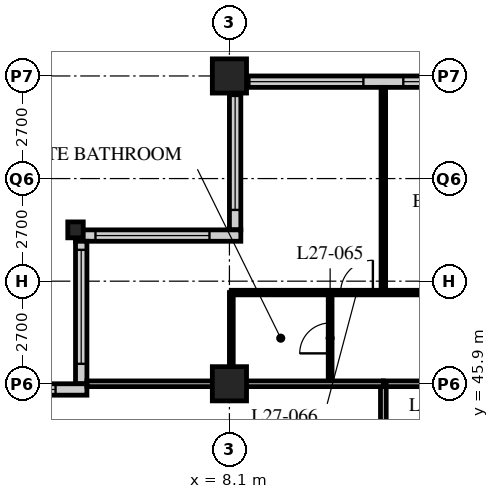
"""IFC4 building model, lengths in metres.
Left out: names, types, materials, properties, quantities, classifications, styles, units other than length and angle.
Written with IfcOpenShell. Run it as: python <this file> out.ifc"""

import sys

from ifc_helpers import new_model, si_unit, direction, frame, frame_2d, origin, origin_2d, place, context, subcontext, project, spatial, rectangle, hollow_rectangle, i_section, extrude, element, fill, save


model = new_model("IFC4")
c1 = context("Model", 3, precision=1e-05, world=origin(), true_north=direction((0.0, 1.0)))
c2 = subcontext(c1, "Body", "Model", "MODEL_VIEW")
j1 = project(units=[si_unit("LENGTHUNIT", "METRE"), si_unit("PLANEANGLEUNIT", "RADIAN")], contexts=[c1])
p1 = place(None, origin())
s1 = spatial("IfcSite", under=j1, at=p1, CompositionType="ELEMENT")
p2 = place(p1, origin())
s2 = spatial("IfcBuilding", under=s1, at=p2, CompositionType="ELEMENT")
p3 = place(p2, frame((0.0, 0.0, 110.2)))
s3 = spatial("IfcBuildingStorey", under=s2, at=p3, CompositionType="ELEMENT", Elevation=110.2)
p4 = place(p3, frame((4.05, 49.95, 0.0), z_axis=(0.0, 0.0, 1.0), x_axis=(1.0, 0.0, 0.0)))
e1 = element("IfcColumn", 1, at=p4, inside=s3, PredefinedType="COLUMN", context=c2, shape_type="SweptSolid", body=[
    extrude(i_section(OverallWidth=0.407, OverallDepth=0.419, WebThickness=0.031, FlangeThickness=0.049, FilletRadius=0.015, at=origin_2d()), origin(), (0.0, 0.0, 1.0), 3.4),
])
for number, where, z_axis, x_axis in (
    (2, (8.1, 45.9, 0.0), (0.0, 0.0, 1.0), (1.0, 0.0, 0.0)),
    (3, (8.1, 54.0, 0.0), (0.0, 0.0, 1.0), (1.0, 0.0, 0.0)),
):
    element("IfcColumn", number, at=place(p3, frame(where, z_axis=z_axis, x_axis=x_axis)), inside=s3, PredefinedType="COLUMN", context=c2, shape_type="SweptSolid", body=[
        extrude(hollow_rectangle(XDim=0.9, YDim=0.9, WallThickness=0.09, at=origin_2d()), origin(), (0.0, 0.0, 1.0), 3.4),
    ])
p5 = place(p3, frame((48.3, 53.85, 0.0), z_axis=(0.0, 0.0, 1.0), x_axis=(-1.0, 0.0, 0.0)))
e4 = element("IfcWall", 4, at=p5, inside=s3, PredefinedType="SOLIDWALL", context=c2, shape_type="SweptSolid", body=[
    extrude(rectangle(XDim=40.2, YDim=0.3, at=frame_2d((20.1, 0.0))), origin(), (0.0, 0.0, 1.0), 3.19),
])
p6 = place(p5, frame((0.225, 0.0, 0.9)))
e5 = element("IfcOpeningElement", 5, at=p6, cuts=e4, PredefinedType="OPENING", context=c2, shape_type="SweptSolid", body=[
    extrude(rectangle(XDim=3.0, YDim=2.0, at=frame_2d((1.5, 1.0))), frame((0.0, 0.16, 0.0), z_axis=(0.0, -1.0, 0.0), x_axis=(1.0, 0.0, 0.0)), (0.0, 0.0, 1.0), 0.32),
])
p7 = place(p5, frame((4.275, 0.0, 0.9)))
e6 = element("IfcOpeningElement", 6, at=p7, cuts=e4, PredefinedType="OPENING", context=c2, shape_type="SweptSolid", body=[
    extrude(rectangle(XDim=3.0, YDim=2.0, at=frame_2d((1.5, 1.0))), frame((0.0, 0.16, 0.0), z_axis=(0.0, -1.0, 0.0), x_axis=(1.0, 0.0, 0.0)), (0.0, 0.0, 1.0), 0.32),
])
p8 = place(p5, frame((8.325, 0.0, 0.9)))
e7 = element("IfcOpeningElement", 7, at=p8, cuts=e4, PredefinedType="OPENING", context=c2, shape_type="SweptSolid", body=[
    extrude(rectangle(XDim=3.0, YDim=2.0, at=frame_2d((1.5, 1.0))), frame((0.0, 0.16, 0.0), z_axis=(0.0, -1.0, 0.0), x_axis=(1.0, 0.0, 0.0)), (0.0, 0.0, 1.0), 0.32),
])
p9 = place(p5, frame((12.375, 0.0, 0.9)))
e8 = element("IfcOpeningElement", 8, at=p9, cuts=e4, PredefinedType="OPENING", context=c2, shape_type="SweptSolid", body=[
    extrude(rectangle(XDim=3.0, YDim=2.0, at=frame_2d((1.5, 1.0))), frame((0.0, 0.16, 0.0), z_axis=(0.0, -1.0, 0.0), x_axis=(1.0, 0.0, 0.0)), (0.0, 0.0, 1.0), 0.32),
])
p10 = place(p5, frame((16.425, 0.0, 0.9)))
e9 = element("IfcOpeningElement", 9, at=p10, cuts=e4, PredefinedType="OPENING", context=c2, shape_type="SweptSolid", body=[
    extrude(rectangle(XDim=3.0, YDim=2.0, at=frame_2d((1.5, 1.0))), frame((0.0, 0.16, 0.0), z_axis=(0.0, -1.0, 0.0), x_axis=(1.0, 0.0, 0.0)), (0.0, 0.0, 1.0), 0.32),
])
p11 = place(p5, frame((20.475, 0.0, 0.9)))
e10 = element("IfcOpeningElement", 10, at=p11, cuts=e4, PredefinedType="OPENING", context=c2, shape_type="SweptSolid", body=[
    extrude(rectangle(XDim=3.0, YDim=2.0, at=frame_2d((1.5, 1.0))), frame((0.0, 0.16, 0.0), z_axis=(0.0, -1.0, 0.0), x_axis=(1.0, 0.0, 0.0)), (0.0, 0.0, 1.0), 0.32),
])
p12 = place(p5, frame((24.525, 0.0, 0.9)))
e11 = element("IfcOpeningElement", 11, at=p12, cuts=e4, PredefinedType="OPENING", context=c2, shape_type="SweptSolid", body=[
    extrude(rectangle(XDim=3.0, YDim=2.0, at=frame_2d((1.5, 1.0))), frame((0.0, 0.16, 0.0), z_axis=(0.0, -1.0, 0.0), x_axis=(1.0, 0.0, 0.0)), (0.0, 0.0, 1.0), 0.32),
])
p13 = place(p5, frame((28.575, 0.0, 0.9)))
e12 = element("IfcOpeningElement", 12, at=p13, cuts=e4, PredefinedType="OPENING", context=c2, shape_type="SweptSolid", body=[
    extrude(rectangle(XDim=3.0, YDim=2.0, at=frame_2d((1.5, 1.0))), frame((0.0, 0.16, 0.0), z_axis=(0.0, -1.0, 0.0), x_axis=(1.0, 0.0, 0.0)), (0.0, 0.0, 1.0), 0.32),
])
p14 = place(p5, frame((32.625, 0.0, 0.9)))
e13 = element("IfcOpeningElement", 13, at=p14, cuts=e4, PredefinedType="OPENING", context=c2, shape_type="SweptSolid", body=[
    extrude(rectangle(XDim=3.0, YDim=2.0, at=frame_2d((1.5, 1.0))), frame((0.0, 0.16, 0.0), z_axis=(0.0, -1.0, 0.0), x_axis=(1.0, 0.0, 0.0)), (0.0, 0.0, 1.0), 0.32),
])
p15 = place(p5, frame((36.675, 0.0, 0.9)))
e14 = element("IfcOpeningElement", 14, at=p15, cuts=e4, PredefinedType="OPENING", context=c2, shape_type="SweptSolid", body=[
    extrude(rectangle(XDim=3.0, YDim=2.0, at=frame_2d((1.5, 1.0))), frame((0.0, 0.16, 0.0), z_axis=(0.0, -1.0, 0.0), x_axis=(1.0, 0.0, 0.0)), (0.0, 0.0, 1.0), 0.32),
])
p16 = place(p3, frame((8.25, 53.7, 0.0), z_axis=(0.0, 0.0, 1.0), x_axis=(0.0, -1.0, 0.0)))
e15 = element("IfcWall", 15, at=p16, inside=s3, PredefinedType="SOLIDWALL", context=c2, shape_type="SweptSolid", body=[
    extrude(rectangle(XDim=3.75, YDim=0.3, at=frame_2d((1.875, 0.0))), origin(), (0.0, 0.0, 1.0), 3.19),
])
p17 = place(p16, frame((0.225, 0.0, 0.9)))
e16 = element("IfcOpeningElement", 16, at=p17, cuts=e15, PredefinedType="OPENING", context=c2, shape_type="SweptSolid", body=[
    extrude(rectangle(XDim=3.0, YDim=1.5, at=frame_2d((1.5, 0.75))), frame((0.0, 0.16, 0.0), z_axis=(0.0, -1.0, 0.0), x_axis=(1.0, 0.0, 0.0)), (0.0, 0.0, 1.0), 0.32),
])
p18 = place(p3, frame((8.4, 49.8, 0.0), z_axis=(0.0, 0.0, 1.0), x_axis=(-1.0, 0.0, 0.0)))
e17 = element("IfcWall", 17, at=p18, inside=s3, PredefinedType="SOLIDWALL", context=c2, shape_type="SweptSolid", body=[
    extrude(rectangle(XDim=4.35, YDim=0.3, at=frame_2d((2.175, 0.0))), origin(), (0.0, 0.0, 1.0), 3.19),
])
p19 = place(p18, frame((0.825, 0.0, 0.9)))
e18 = element("IfcOpeningElement", 18, at=p19, cuts=e17, PredefinedType="OPENING", context=c2, shape_type="SweptSolid", body=[
    extrude(rectangle(XDim=3.0, YDim=1.5, at=frame_2d((1.5, 0.75))), frame((0.0, 0.16, 0.0), z_axis=(0.0, -1.0, 0.0), x_axis=(1.0, 0.0, 0.0)), (0.0, 0.0, 1.0), 0.32),
])
p20 = place(p3, frame((4.2, 49.65, 0.0), z_axis=(0.0, 0.0, 1.0), x_axis=(0.0, -1.0, 0.0)))
e19 = element("IfcWall", 19, at=p20, inside=s3, PredefinedType="SOLIDWALL", context=c2, shape_type="SweptSolid", body=[
    extrude(rectangle(XDim=3.75, YDim=0.3, at=frame_2d((1.875, 0.0))), origin(), (0.0, 0.0, 1.0), 3.19),
])
p21 = place(p20, frame((0.225, 0.0, 0.9)))
e20 = element("IfcOpeningElement", 20, at=p21, cuts=e19, PredefinedType="OPENING", context=c2, shape_type="SweptSolid", body=[
    extrude(rectangle(XDim=3.0, YDim=1.5, at=frame_2d((1.5, 0.75))), frame((0.0, 0.16, 0.0), z_axis=(0.0, -1.0, 0.0), x_axis=(1.0, 0.0, 0.0)), (0.0, 0.0, 1.0), 0.32),
])
p22 = place(p3, frame((4.35, 45.75, 0.0), z_axis=(0.0, 0.0, 1.0), x_axis=(-1.0, 0.0, 0.0)))
e21 = element("IfcWall", 21, at=p22, inside=s3, PredefinedType="SOLIDWALL", context=c2, shape_type="SweptSolid", body=[
    extrude(rectangle(XDim=4.35, YDim=0.3, at=frame_2d((2.175, 0.0))), origin(), (0.0, 0.0, 1.0), 3.19),
])
p23 = place(p22, frame((0.825, 0.0, 0.9)))
e22 = element("IfcOpeningElement", 22, at=p23, cuts=e21, PredefinedType="OPENING", context=c2, shape_type="SweptSolid", body=[
    extrude(rectangle(XDim=3.0, YDim=1.5, at=frame_2d((1.5, 0.75))), frame((0.0, 0.16, 0.0), z_axis=(0.0, -1.0, 0.0), x_axis=(1.0, 0.0, 0.0)), (0.0, 0.0, 1.0), 0.32),
])
p24 = place(p3, frame((12.15, 45.9, 0.0), z_axis=(0.0, 0.0, 1.0), x_axis=(1.0, 0.0, 0.0)))
e23 = element("IfcWall", 23, at=p24, inside=s3, PredefinedType="PARTITIONING", context=c2, shape_type="SweptSolid", body=[
    extrude(rectangle(XDim=32.4, YDim=0.15, at=frame_2d((16.2, 0.0))), origin(), (0.0, 0.0, 1.0), 2.578),
])
p25 = place(p24, frame((9.5, 0.0, 0.0)))
e24 = element("IfcOpeningElement", 24, at=p25, cuts=e23, PredefinedType="OPENING", context=c2, shape_type="SweptSolid", body=[
    extrude(rectangle(XDim=1.0, YDim=2.1, at=frame_2d((0.5, 1.05))), frame((0.0, 0.085, 0.0), z_axis=(0.0, -1.0, 0.0), x_axis=(1.0, 0.0, 0.0)), (0.0, 0.0, 1.0), 0.17),
])
p26 = place(p24, frame((17.6, 0.0, 0.0)))
e25 = element("IfcOpeningElement", 25, at=p26, cuts=e23, PredefinedType="OPENING", context=c2, shape_type="SweptSolid", body=[
    extrude(rectangle(XDim=1.0, YDim=2.1, at=frame_2d((0.5, 1.05))), frame((0.0, 0.085, 0.0), z_axis=(0.0, -1.0, 0.0), x_axis=(1.0, 0.0, 0.0)), (0.0, 0.0, 1.0), 0.17),
])
p27 = place(p24, frame((25.7, 0.0, 0.0)))
e26 = element("IfcOpeningElement", 26, at=p27, cuts=e23, PredefinedType="OPENING", context=c2, shape_type="SweptSolid", body=[
    extrude(rectangle(XDim=1.0, YDim=2.1, at=frame_2d((0.5, 1.05))), frame((0.0, 0.085, 0.0), z_axis=(0.0, -1.0, 0.0), x_axis=(1.0, 0.0, 0.0)), (0.0, 0.0, 1.0), 0.17),
])
p28 = place(p24, frame((29.875, 0.0, 0.0)))
e27 = element("IfcOpeningElement", 27, at=p28, cuts=e23, PredefinedType="OPENING", context=c2, shape_type="SweptSolid", body=[
    extrude(rectangle(XDim=1.0, YDim=2.1, at=frame_2d((0.5, 1.05))), frame((0.0, 0.085, 0.0), z_axis=(0.0, -1.0, 0.0), x_axis=(1.0, 0.0, 0.0)), (0.0, 0.0, 1.0), 0.17),
])
p29 = place(p24, frame((1.525, 0.0, 0.0)))
e28 = element("IfcOpeningElement", 28, at=p29, cuts=e23, PredefinedType="OPENING", context=c2, shape_type="SweptSolid", body=[
    extrude(rectangle(XDim=1.0, YDim=2.1, at=frame_2d((0.5, 1.05))), frame((0.0, 0.085, 0.0), z_axis=(0.0, -1.0, 0.0), x_axis=(1.0, 0.0, 0.0)), (0.0, 0.0, 1.0), 0.17),
])
p30 = place(p3, frame((12.15, 21.6, 0.0), z_axis=(0.0, 0.0, 1.0), x_axis=(0.0, 1.0, 0.0)))
e29 = element("IfcWall", 29, at=p30, inside=s3, PredefinedType="PARTITIONING", context=c2, shape_type="SweptSolid", body=[
    extrude(rectangle(XDim=24.3, YDim=0.15, at=frame_2d((12.15, 0.0))), origin(), (0.0, 0.0, 1.0), 3.19),
])
p31 = place(p30, frame((5.45, 0.0, 0.0)))
e30 = element("IfcOpeningElement", 30, at=p31, cuts=e29, PredefinedType="OPENING", context=c2, shape_type="SweptSolid", body=[
    extrude(rectangle(XDim=1.0, YDim=2.1, at=frame_2d((0.5, 1.05))), frame((0.0, 0.085, 0.0), z_axis=(0.0, -1.0, 0.0), x_axis=(1.0, 0.0, 0.0)), (0.0, 0.0, 1.0), 0.17),
])
p32 = place(p30, frame((13.55, 0.0, 0.0)))
e31 = element("IfcOpeningElement", 31, at=p32, cuts=e29, PredefinedType="OPENING", context=c2, shape_type="SweptSolid", body=[
    extrude(rectangle(XDim=1.0, YDim=2.1, at=frame_2d((0.5, 1.05))), frame((0.0, 0.085, 0.0), z_axis=(0.0, -1.0, 0.0), x_axis=(1.0, 0.0, 0.0)), (0.0, 0.0, 1.0), 0.17),
])
p33 = place(p30, frame((21.65, 0.0, 0.0)))
e32 = element("IfcOpeningElement", 32, at=p33, cuts=e29, PredefinedType="OPENING", context=c2, shape_type="SweptSolid", body=[
    extrude(rectangle(XDim=1.0, YDim=2.1, at=frame_2d((0.5, 1.05))), frame((0.0, 0.085, 0.0), z_axis=(0.0, -1.0, 0.0), x_axis=(1.0, 0.0, 0.0)), (0.0, 0.0, 1.0), 0.17),
])
p34 = place(p3, frame((10.75, 45.9, 0.0), z_axis=(0.0, 0.0, 1.0), x_axis=(0.0, 1.0, 0.0)))
e33 = element("IfcWall", 33, at=p34, inside=s3, PredefinedType="PARTITIONING", context=c2, shape_type="SweptSolid", body=[
    extrude(rectangle(XDim=2.4, YDim=0.1, at=frame_2d((1.2, 0.0))), origin(), (0.0, 0.0, 1.0), 3.19),
])
p35 = place(p34, frame((0.8, 0.0, 0.0)))
e34 = element("IfcOpeningElement", 34, at=p35, cuts=e33, PredefinedType="OPENING", context=c2, shape_type="SweptSolid", body=[
    extrude(rectangle(XDim=0.8, YDim=2.1, at=frame_2d((0.4, 1.05))), frame((0.0, 0.06, 0.0), z_axis=(0.0, -1.0, 0.0), x_axis=(1.0, 0.0, 0.0)), (0.0, 0.0, 1.0), 0.12),
])
p36 = place(p3, frame((8.15, 45.9, 0.0), z_axis=(0.0, 0.0, 1.0), x_axis=(0.0, 1.0, 0.0)))
e35 = element("IfcWall", 35, at=p36, inside=s3, PredefinedType="PARTITIONING", context=c2, shape_type="SweptSolid", body=[
    extrude(rectangle(XDim=2.4, YDim=0.1, at=frame_2d((1.2, 0.0))), origin(), (0.0, 0.0, 1.0), 2.578),
])
p37 = place(p3, frame((8.15, 48.3, 0.0), z_axis=(0.0, 0.0, 1.0), x_axis=(1.0, 0.0, 0.0)))
e36 = element("IfcWall", 36, at=p37, inside=s3, PredefinedType="PARTITIONING", context=c2, shape_type="SweptSolid", body=[
    extrude(rectangle(XDim=8.05, YDim=0.12, at=frame_2d((4.025, 0.0))), origin(), (0.0, 0.0, 1.0), 3.19),
])
p38 = place(p37, frame((6.725, 0.0, 0.0)))
e37 = element("IfcOpeningElement", 37, at=p38, cuts=e36, PredefinedType="OPENING", context=c2, shape_type="SweptSolid", body=[
    extrude(rectangle(XDim=0.85, YDim=2.1, at=frame_2d((0.425, 1.05))), frame((0.0, 0.07, 0.0), z_axis=(0.0, -1.0, 0.0), x_axis=(1.0, 0.0, 0.0)), (0.0, 0.0, 1.0), 0.14),
])
p39 = place(p37, frame((2.875, 0.0, 0.0)))
e38 = element("IfcOpeningElement", 38, at=p39, cuts=e36, PredefinedType="OPENING", context=c2, shape_type="SweptSolid", body=[
    extrude(rectangle(XDim=0.85, YDim=2.1, at=frame_2d((0.425, 1.05))), frame((0.0, 0.07, 0.0), z_axis=(0.0, -1.0, 0.0), x_axis=(1.0, 0.0, 0.0)), (0.0, 0.0, 1.0), 0.14),
])
p40 = place(p3, frame((12.15, 48.3, 0.0), z_axis=(0.0, 0.0, 1.0), x_axis=(0.0, 1.0, 0.0)))
e39 = element("IfcWall", 39, at=p40, inside=s3, PredefinedType="PARTITIONING", context=c2, shape_type="SweptSolid", body=[
    extrude(rectangle(XDim=5.4, YDim=0.12, at=frame_2d((2.7, 0.0))), origin(), (0.0, 0.0, 1.0), 3.19),
])
p41 = place(p3, frame((4.35, 45.9, 0.0), z_axis=(0.0, 0.0, 1.0), x_axis=(1.0, 0.0, 0.0)))
e40 = element("IfcWall", 40, at=p41, inside=s3, PredefinedType="PARTITIONING", context=c2, shape_type="SweptSolid", body=[
    extrude(rectangle(XDim=7.8, YDim=0.15, at=frame_2d((3.9, 0.0))), origin(), (0.0, 0.0, 1.0), 2.578),
])
p42 = place(p14, origin())
e41 = element("IfcWindow", 41, at=p42, inside=s3, PartitioningType="SINGLE_PANEL", PredefinedType="WINDOW", context=c2, shape_type="SweptSolid", body=[
    extrude(rectangle(XDim=3.0, YDim=2.0, at=frame_2d((1.5, 1.0))), frame((0.0, 0.03, 0.0), z_axis=(0.0, -1.0, 0.0), x_axis=(1.0, 0.0, 0.0)), (0.0, 0.0, 1.0), 0.06),
])
fill(e13, e41)
p43 = place(p15, origin())
e42 = element("IfcWindow", 42, at=p43, inside=s3, PartitioningType="SINGLE_PANEL", PredefinedType="WINDOW", context=c2, shape_type="SweptSolid", body=[
    extrude(rectangle(XDim=3.0, YDim=2.0, at=frame_2d((1.5, 1.0))), frame((0.0, 0.03, 0.0), z_axis=(0.0, -1.0, 0.0), x_axis=(1.0, 0.0, 0.0)), (0.0, 0.0, 1.0), 0.06),
])
fill(e14, e42)
p44 = place(p17, origin())
e43 = element("IfcWindow", 43, at=p44, inside=s3, PartitioningType="SINGLE_PANEL", PredefinedType="WINDOW", context=c2, shape_type="SweptSolid", body=[
    extrude(rectangle(XDim=3.0, YDim=1.5, at=frame_2d((1.5, 0.75))), frame((0.0, 0.03, 0.0), z_axis=(0.0, -1.0, 0.0), x_axis=(1.0, 0.0, 0.0)), (0.0, 0.0, 1.0), 0.06),
])
fill(e16, e43)
p45 = place(p19, origin())
e44 = element("IfcWindow", 44, at=p45, inside=s3, PartitioningType="SINGLE_PANEL", PredefinedType="WINDOW", context=c2, shape_type="SweptSolid", body=[
    extrude(rectangle(XDim=3.0, YDim=1.5, at=frame_2d((1.5, 0.75))), frame((0.0, 0.03, 0.0), z_axis=(0.0, -1.0, 0.0), x_axis=(1.0, 0.0, 0.0)), (0.0, 0.0, 1.0), 0.06),
])
fill(e18, e44)
p46 = place(p21, origin())
e45 = element("IfcWindow", 45, at=p46, inside=s3, PartitioningType="SINGLE_PANEL", PredefinedType="WINDOW", context=c2, shape_type="SweptSolid", body=[
    extrude(rectangle(XDim=3.0, YDim=1.5, at=frame_2d((1.5, 0.75))), frame((0.0, 0.03, 0.0), z_axis=(0.0, -1.0, 0.0), x_axis=(1.0, 0.0, 0.0)), (0.0, 0.0, 1.0), 0.06),
])
fill(e20, e45)
p47 = place(p23, origin())
e46 = element("IfcWindow", 46, at=p47, inside=s3, PartitioningType="SINGLE_PANEL", PredefinedType="WINDOW", context=c2, shape_type="SweptSolid", body=[
    extrude(rectangle(XDim=3.0, YDim=1.5, at=frame_2d((1.5, 0.75))), frame((0.0, 0.03, 0.0), z_axis=(0.0, -1.0, 0.0), x_axis=(1.0, 0.0, 0.0)), (0.0, 0.0, 1.0), 0.06),
])
fill(e22, e46)
p48 = place(p35, origin())
e47 = element("IfcDoor", 47, at=p48, inside=s3, OperationType="SINGLE_SWING_LEFT", PredefinedType="DOOR", context=c2, shape_type="SweptSolid", body=[
    extrude(rectangle(XDim=0.8, YDim=2.1, at=frame_2d((0.4, 1.05))), frame((0.0, 0.025, 0.0), z_axis=(0.0, -1.0, 0.0), x_axis=(1.0, 0.0, 0.0)), (0.0, 0.0, 1.0), 0.05),
])
fill(e34, e47)
p49 = place(p39, origin())
e48 = element("IfcDoor", 48, at=p49, inside=s3, OperationType="SINGLE_SWING_RIGHT", PredefinedType="DOOR", context=c2, shape_type="SweptSolid", body=[
    extrude(rectangle(XDim=0.85, YDim=2.1, at=frame_2d((0.425, 1.05))), frame((0.0, 0.025, 0.0), z_axis=(0.0, -1.0, 0.0), x_axis=(1.0, 0.0, 0.0)), (0.0, 0.0, 1.0), 0.05),
])
fill(e38, e48)
save(model, sys.argv[1])
